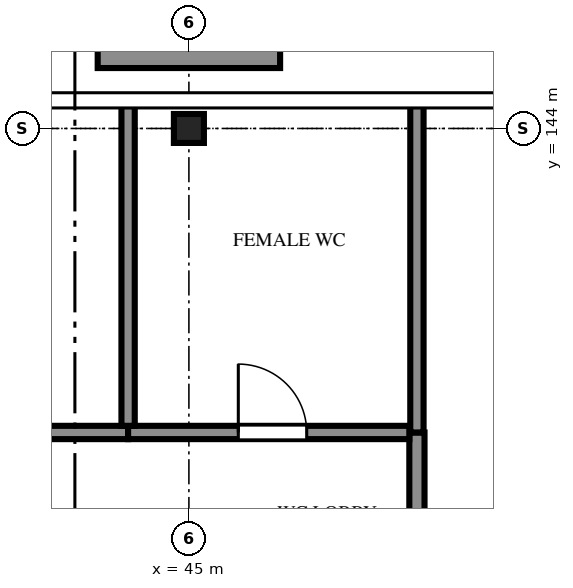
"""IFC4 building model, lengths in metres.
Left out: names, types, materials, properties, quantities, classifications, styles, units other than length and angle.
Written with IfcOpenShell. Run it as: python <this file> out.ifc"""

import sys

from ifc_helpers import new_model, si_unit, direction, frame, frame_2d, origin, origin_2d, place, context, subcontext, project, spatial, polyline, rectangle, i_section, outline, extrude, element, fill, save


model = new_model("IFC4")
c1 = context("Model", 3, precision=1e-05, world=origin(), true_north=direction((0.0, 1.0)))
c2 = subcontext(c1, "Body", "Model", "MODEL_VIEW")
j1 = project(units=[si_unit("LENGTHUNIT", "METRE"), si_unit("PLANEANGLEUNIT", "RADIAN")], contexts=[c1])
p1 = place(None, origin())
s1 = spatial("IfcSite", under=j1, at=p1, CompositionType="ELEMENT")
p2 = place(p1, origin())
s2 = spatial("IfcBuilding", under=s1, at=p2, CompositionType="ELEMENT")
p3 = place(p2, frame((0.0, 0.0, 15.9)))
s3 = spatial("IfcBuildingStorey", under=s2, at=p3, CompositionType="ELEMENT", Elevation=15.9)
p4 = place(p3, frame((45.0, 144.0, 0.0), z_axis=(0.0, 0.0, 1.0), x_axis=(1.0, 0.0, 0.0)))
e1 = element("IfcColumn", 1, at=p4, inside=s3, PredefinedType="COLUMN", context=c2, shape_type="SweptSolid", body=[
    extrude(i_section(OverallWidth=0.395, OverallDepth=0.381, WebThickness=0.018, FlangeThickness=0.03, FilletRadius=0.015, at=origin_2d()), origin(), (0.0, 0.0, 1.0), 4.2),
])
p5 = place(p3, frame((43.8, 145.62, 0.0), z_axis=(0.0, 0.0, 1.0), x_axis=(1.0, 0.0, 0.0)))
e2 = element("IfcWall", 2, at=p5, inside=s3, PredefinedType="SOLIDWALL", context=c2, shape_type="SweptSolid", body=[
    extrude(rectangle(XDim=2.4, YDim=1.65, at=frame_2d((1.2, 0.0))), origin(), (0.0, 0.0, 1.0), 4.2),
])
p6 = place(p3, frame((48.0, 140.0, 0.0), z_axis=(0.0, 0.0, 1.0), x_axis=(0.0, -1.0, 0.0)))
e3 = element("IfcWall", 3, at=p6, inside=s3, PredefinedType="PARTITIONING", context=c2, shape_type="SweptSolid", body=[
    extrude(rectangle(XDim=2.0, YDim=0.2, at=frame_2d((1.0, 0.0))), origin(), (0.0, 0.0, 1.0), 3.382),
])
p7 = place(p3, frame((40.4, 140.0, 0.0), z_axis=(0.0, 0.0, 1.0), x_axis=(1.0, 0.0, 0.0)))
e4 = element("IfcWall", 4, at=p7, inside=s3, PredefinedType="PARTITIONING", context=c2, shape_type="SweptSolid", body=[
    extrude(rectangle(XDim=3.8, YDim=0.175, at=frame_2d((1.9, 0.0))), origin(), (0.0, 0.0, 1.0), 3.307),
])
p8 = place(p7, frame((1.45, 0.0, 0.0)))
e5 = element("IfcOpeningElement", 5, at=p8, cuts=e4, PredefinedType="OPENING", context=c2, shape_type="SweptSolid", body=[
    extrude(rectangle(XDim=0.9, YDim=2.1, at=frame_2d((0.45, 1.05))), frame((0.0, 0.097, 0.0), z_axis=(0.0, -1.0, 0.0), x_axis=(1.0, 0.0, 0.0)), (0.0, 0.0, 1.0), 0.195),
])
p9 = place(p3, frame((44.2, 140.0, 0.0), z_axis=(0.0, 0.0, 1.0), x_axis=(1.0, 0.0, 0.0)))
e6 = element("IfcWall", 6, at=p9, inside=s3, PredefinedType="PARTITIONING", context=c2, shape_type="SweptSolid", body=[
    extrude(rectangle(XDim=3.7, YDim=0.175, at=frame_2d((1.85, 0.0))), origin(), (0.0, 0.0, 1.0), 3.307),
])
p10 = place(p9, frame((1.45, 0.0, 0.0)))
e7 = element("IfcOpeningElement", 7, at=p10, cuts=e6, PredefinedType="OPENING", context=c2, shape_type="SweptSolid", body=[
    extrude(rectangle(XDim=0.9, YDim=2.1, at=frame_2d((0.45, 1.05))), frame((0.0, 0.097, 0.0), z_axis=(0.0, -1.0, 0.0), x_axis=(1.0, 0.0, 0.0)), (0.0, 0.0, 1.0), 0.195),
])
p11 = place(p3, frame((44.2, 144.295, 0.0), z_axis=(0.0, 0.0, 1.0), x_axis=(0.0, -1.0, 0.0)))
e8 = element("IfcWall", 8, at=p11, inside=s3, PredefinedType="PARTITIONING", context=c2, shape_type="SweptSolid", body=[
    extrude(rectangle(XDim=4.208, YDim=0.175, at=frame_2d((2.104, 0.0))), origin(), (0.0, 0.0, 1.0), 3.307),
])
p12 = place(p3, frame((48.0, 144.295, 0.0), z_axis=(0.0, 0.0, 1.0), x_axis=(0.0, -1.0, 0.0)))
e9 = element("IfcWall", 9, at=p12, inside=s3, PredefinedType="PARTITIONING", context=c2, shape_type="SweptSolid", body=[
    extrude(rectangle(XDim=4.295, YDim=0.175, at=frame_2d((2.147, 0.0))), origin(), (0.0, 0.0, 1.0), 3.307),
])
p13 = place(p10, origin())
e10 = element("IfcDoor", 10, at=p13, inside=s3, OperationType="SINGLE_SWING_LEFT", PredefinedType="DOOR", context=c2, shape_type="SweptSolid", body=[
    extrude(outline(polyline([(0.0, 0.0), (0.07, 0.0), (0.07, 2.03), (0.83, 2.03), (0.83, 0.0), (0.9, 0.0), (0.9, 2.1), (0.0, 2.1), (0.0, 0.0)])), frame((0.0, 0.025, 0.0), z_axis=(0.0, -1.0, 0.0), x_axis=(1.0, 0.0, 0.0)), (0.0, 0.0, 1.0), 0.05),
    extrude(outline(polyline([(0.074, 0.01), (0.826, 0.01), (0.826, 2.026), (0.074, 2.026), (0.074, 0.01)]), holes=[polyline([(0.194, 0.16), (0.706, 0.16), (0.706, 1.01), (0.194, 1.01), (0.194, 0.16)]), polyline([(0.3, 1.16), (0.6, 1.16), (0.6, 1.76), (0.3, 1.76), (0.3, 1.16)])]), frame((0.0, 0.017, 0.0), z_axis=(0.0, -1.0, 0.0), x_axis=(1.0, 0.0, 0.0)), (0.0, 0.0, 1.0), 0.035),
    extrude(rectangle(XDim=0.512, YDim=0.85, at=frame_2d((0.45, 0.585))), frame((0.0, 0.009, 0.0), z_axis=(0.0, -1.0, 0.0), x_axis=(1.0, 0.0, 0.0)), (0.0, 0.0, 1.0), 0.017),
    extrude(rectangle(XDim=0.3, YDim=0.6, at=frame_2d((0.45, 1.46))), frame((0.0, 0.006, 0.0), z_axis=(0.0, -1.0, 0.0), x_axis=(1.0, 0.0, 0.0)), (0.0, 0.0, 1.0), 0.012),
])
fill(e7, e10)
save(model, sys.argv[1])
